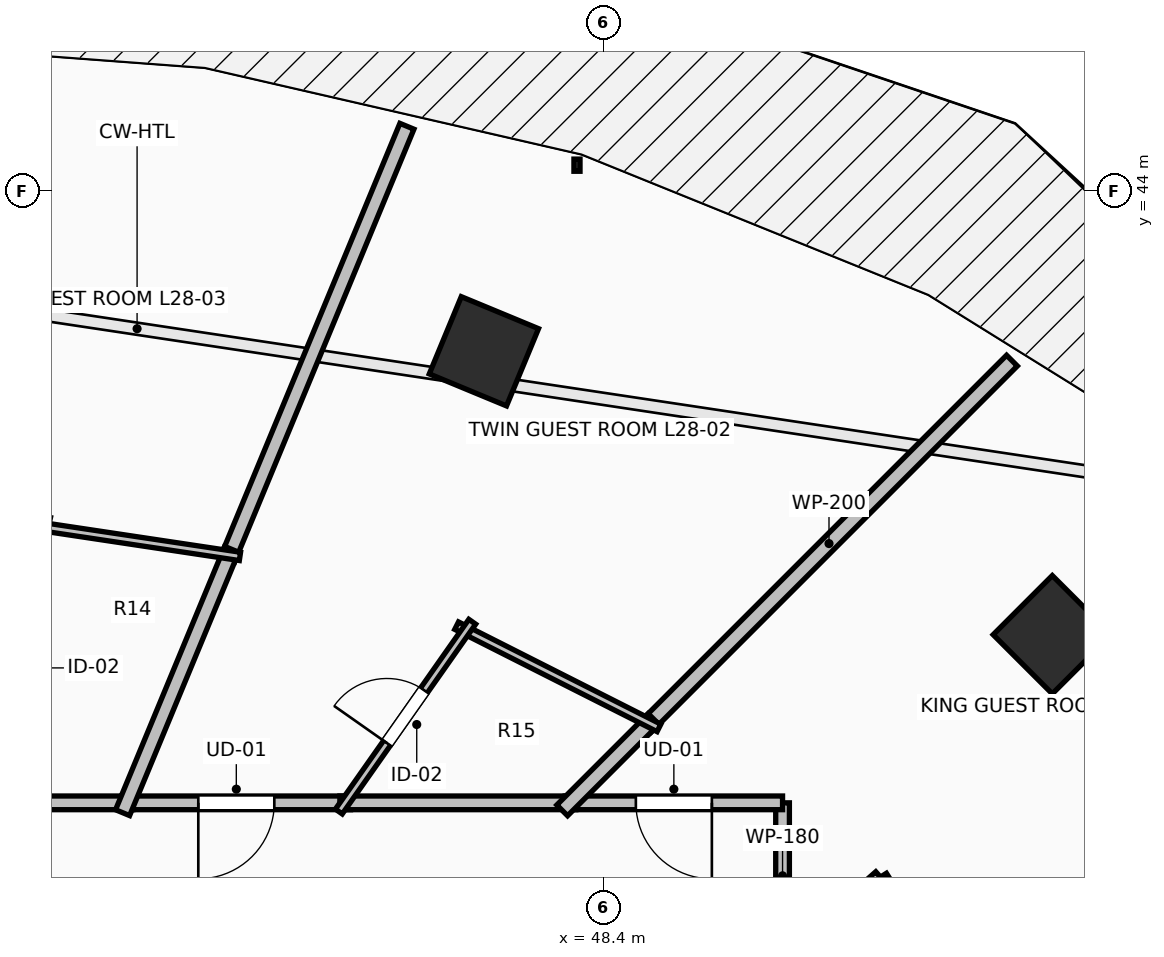
"""IFC4 building model, lengths in metres.
Left out: names, types, materials, properties, quantities, classifications, styles, units other than length and angle.
Written with IfcOpenShell. Run it as: python <this file> out.ifc"""

import sys

from ifc_helpers import new_model, si_unit, direction, frame, frame_2d, origin, origin_2d, place, context, subcontext, project, spatial, rectangle, extrude, element, fill, save


model = new_model("IFC4")
c1 = context("Model", 3, precision=1e-05, world=origin(), true_north=direction((0.0, 1.0)))
c2 = subcontext(c1, "Body", "Model", "MODEL_VIEW")
j1 = project(units=[si_unit("LENGTHUNIT", "METRE"), si_unit("PLANEANGLEUNIT", "RADIAN")], contexts=[c1])
p1 = place(None, origin())
s1 = spatial("IfcSite", under=j1, at=p1, CompositionType="ELEMENT")
p2 = place(p1, origin())
s2 = spatial("IfcBuilding", under=s1, at=p2, CompositionType="ELEMENT")
p3 = place(p2, frame((0.0, 0.0, 106.8)))
s3 = spatial("IfcBuildingStorey", under=s2, at=p3, CompositionType="ELEMENT", Elevation=106.8)
for number, where, z_axis, x_axis in (
    (1, (54.299, 38.162, 0.0), (0.0, 0.0, 1.0), (0.707, 0.707, 0.0)),
    (2, (46.821, 41.891, 0.0), (0.0, 0.0, 1.0), (0.383, 0.924, 0.0)),
):
    element("IfcColumn", number, at=place(p3, frame(where, z_axis=z_axis, x_axis=x_axis)), inside=s3, PredefinedType="COLUMN", context=c2, shape_type="SweptSolid", body=[
        extrude(rectangle(XDim=1.1, YDim=1.1, at=origin_2d()), origin(), (0.0, 0.0, 1.0), 3.5),
    ])
p4 = place(p3, frame((50.75, 34.031, 0.0), z_axis=(0.0, 0.0, 1.0), x_axis=(0.0, 1.0, 0.0)))
e3 = element("IfcWall", 3, at=p4, inside=s3, PredefinedType="PARTITIONING", context=c2, shape_type="SweptSolid", body=[
    extrude(rectangle(XDim=1.919, YDim=0.18, at=frame_2d((0.959, 0.0))), origin(), (0.0, 0.0, 1.0), 2.432),
])
p5 = place(p3, frame((50.75, 35.95, 0.0), z_axis=(0.0, 0.0, 1.0), x_axis=(-1.0, 0.0, 0.0)))
e4 = element("IfcWall", 4, at=p5, inside=s3, PredefinedType="PARTITIONING", context=c2, shape_type="SweptSolid", body=[
    extrude(rectangle(XDim=2.86, YDim=0.18, at=frame_2d((1.43, 0.0))), origin(), (0.0, 0.0, 1.0), 2.432),
])
p6 = place(p5, frame((0.93, 0.0, 0.0)))
e5 = element("IfcOpeningElement", 5, at=p6, cuts=e4, PredefinedType="OPENING", context=c2, shape_type="SweptSolid", body=[
    extrude(rectangle(XDim=1.0, YDim=2.15, at=frame_2d((0.5, 1.075))), frame((0.0, 0.105, 0.0), z_axis=(0.0, -1.0, 0.0), x_axis=(1.0, 0.0, 0.0)), (0.0, 0.0, 1.0), 0.21),
])
p7 = place(p3, frame((45.066, 35.95, 0.0), z_axis=(0.0, 0.0, 1.0), x_axis=(-1.0, 0.0, 0.0)))
e6 = element("IfcWall", 6, at=p7, inside=s3, PredefinedType="PARTITIONING", context=c2, shape_type="SweptSolid", body=[
    extrude(rectangle(XDim=3.005, YDim=0.18, at=frame_2d((1.502, 0.0))), origin(), (0.0, 0.0, 1.0), 3.24),
])
p8 = place(p7, frame((1.002, 0.0, 0.0)))
e7 = element("IfcOpeningElement", 7, at=p8, cuts=e6, PredefinedType="OPENING", context=c2, shape_type="SweptSolid", body=[
    extrude(rectangle(XDim=1.0, YDim=2.15, at=frame_2d((0.5, 1.075))), frame((0.0, 0.105, 0.0), z_axis=(0.0, -1.0, 0.0), x_axis=(1.0, 0.0, 0.0)), (0.0, 0.0, 1.0), 0.21),
])
p9 = place(p3, frame((48.03, 35.95, 0.0), z_axis=(0.0, 0.0, 1.0), x_axis=(-1.0, 0.0, 0.0)))
e8 = element("IfcWall", 8, at=p9, inside=s3, PredefinedType="PARTITIONING", context=c2, shape_type="SweptSolid", body=[
    extrude(rectangle(XDim=3.104, YDim=0.18, at=frame_2d((1.552, 0.0))), origin(), (0.0, 0.0, 1.0), 2.432),
])
p10 = place(p3, frame((42.201, 35.95, 0.0), z_axis=(0.0, 0.0, 1.0), x_axis=(-1.0, 0.0, 0.0)))
e9 = element("IfcWall", 9, at=p10, inside=s3, PredefinedType="PARTITIONING", context=c2, shape_type="SweptSolid", body=[
    extrude(rectangle(XDim=2.056, YDim=0.18, at=frame_2d((1.028, 0.0))), origin(), (0.0, 0.0, 1.0), 3.24),
])
p11 = place(p3, frame((51.935, 35.007, 0.0), z_axis=(0.0, 0.0, 1.0), x_axis=(0.662059609276, -0.749451181709, 0.0)))
e10 = element("IfcWall", 10, at=p11, inside=s3, PredefinedType="PARTITIONING", context=c2, shape_type="SweptSolid", body=[
    extrude(rectangle(XDim=3.299, YDim=0.11, at=frame_2d((1.65, 0.0))), origin(), (0.0, 0.0, 1.0), 2.432),
])
p12 = place(p11, frame((1.225, 0.0, 0.0)))
e11 = element("IfcOpeningElement", 11, at=p12, cuts=e10, PredefinedType="OPENING", context=c2, shape_type="SweptSolid", body=[
    extrude(rectangle(XDim=0.85, YDim=2.1, at=frame_2d((0.425, 1.05))), frame((0.0, 0.07, 0.0), z_axis=(0.0, -1.0, 0.0), x_axis=(1.0, 0.0, 0.0)), (0.0, 0.0, 1.0), 0.14),
])
p13 = place(p3, frame((50.632, 34.016, 0.0), z_axis=(0.0, 0.0, 1.0), x_axis=(0.844361394482, 0.535774052665, 0.0)))
e12 = element("IfcWall", 12, at=p13, inside=s3, PredefinedType="PARTITIONING", context=c2, shape_type="SweptSolid", body=[
    extrude(rectangle(XDim=1.793, YDim=0.11, at=frame_2d((0.897, 0.0))), origin(), (0.0, 0.0, 1.0), 2.886),
])
p14 = place(p3, frame((53.768, 41.768, 0.0), z_axis=(0.0, 0.0, 1.0), x_axis=(-0.707106781187, -0.707106781187, 0.0)))
e13 = element("IfcWall", 13, at=p14, inside=s3, PredefinedType="PARTITIONING", context=c2, shape_type="SweptSolid", body=[
    extrude(rectangle(XDim=6.808, YDim=0.2, at=frame_2d((3.404, 0.0))), origin(), (0.0, 0.0, 1.0), 2.677),
])
p15 = place(p3, frame((49.053, 37.053, 0.0), z_axis=(0.0, 0.0, 1.0), x_axis=(-0.707106781187, -0.707106781187, 0.0)))
e14 = element("IfcWall", 14, at=p15, inside=s3, PredefinedType="PARTITIONING", context=c2, shape_type="SweptSolid", body=[
    extrude(rectangle(XDim=1.7, YDim=0.2, at=frame_2d((0.85, 0.0))), origin(), (0.0, 0.0, 1.0), 2.432),
])
p16 = place(p3, frame((54.156, 32.692, 0.0), z_axis=(0.0, 0.0, 1.0), x_axis=(0.923875192571, 0.38269390974, 0.0)))
e15 = element("IfcWall", 15, at=p16, inside=s3, PredefinedType="PARTITIONING", context=c2, shape_type="SweptSolid", body=[
    extrude(rectangle(XDim=7.311, YDim=0.2, at=frame_2d((3.656, 0.0))), origin(), (0.0, 0.0, 1.0), 2.432),
])
p17 = place(p3, frame((46.462, 38.281, 0.0), z_axis=(0.0, 0.0, 1.0), x_axis=(0.892486842203, -0.451073426944, 0.0)))
e16 = element("IfcWall", 16, at=p17, inside=s3, PredefinedType="PARTITIONING", context=c2, shape_type="SweptSolid", body=[
    extrude(rectangle(XDim=2.982, YDim=0.11, at=frame_2d((1.491, 0.0))), origin(), (0.0, 0.0, 1.0), 2.432),
])
p18 = place(p3, frame((44.913, 35.835, 0.0), z_axis=(0.0, 0.0, 1.0), x_axis=(0.574986040322, 0.818163219312, 0.0)))
e17 = element("IfcWall", 17, at=p18, inside=s3, PredefinedType="PARTITIONING", context=c2, shape_type="SweptSolid", body=[
    extrude(rectangle(XDim=3.052, YDim=0.11, at=frame_2d((1.526, 0.0))), origin(), (0.0, 0.0, 1.0), 2.886),
])
p19 = place(p18, frame((1.101, 0.0, 0.0)))
e18 = element("IfcOpeningElement", 18, at=p19, cuts=e17, PredefinedType="OPENING", context=c2, shape_type="SweptSolid", body=[
    extrude(rectangle(XDim=0.85, YDim=2.1, at=frame_2d((0.425, 1.05))), frame((0.0, 0.07, 0.0), z_axis=(0.0, -1.0, 0.0), x_axis=(1.0, 0.0, 0.0)), (0.0, 0.0, 1.0), 0.14),
])
p20 = place(p3, frame((45.808, 44.851, 0.0), z_axis=(0.0, 0.0, 1.0), x_axis=(-0.382705075352, -0.923870567395, 0.0)))
e19 = element("IfcWall", 19, at=p20, inside=s3, PredefinedType="PARTITIONING", context=c2, shape_type="SweptSolid", body=[
    extrude(rectangle(XDim=6.164, YDim=0.2, at=frame_2d((3.082, 0.0))), origin(), (0.0, 0.0, 1.0), 2.677),
])
p21 = place(p3, frame((43.503, 39.285, 0.0), z_axis=(0.0, 0.0, 1.0), x_axis=(-0.382733183699, -0.923858923265, 0.0)))
e20 = element("IfcWall", 20, at=p21, inside=s3, PredefinedType="PARTITIONING", context=c2, shape_type="SweptSolid", body=[
    extrude(rectangle(XDim=3.75, YDim=0.2, at=frame_2d((1.875, 0.0))), origin(), (0.0, 0.0, 1.0), 2.886),
])
p22 = place(p3, frame((40.896, 39.6, 0.0), z_axis=(0.0, 0.0, 1.0), x_axis=(0.98891024541, -0.148514398367, 0.0)))
e21 = element("IfcWall", 21, at=p22, inside=s3, PredefinedType="PARTITIONING", context=c2, shape_type="SweptSolid", body=[
    extrude(rectangle(XDim=2.745, YDim=0.11, at=frame_2d((1.373, 0.0))), origin(), (0.0, 0.0, 1.0), 2.972),
])
p23 = place(p6, origin())
e22 = element("IfcDoor", 22, at=p23, inside=s3, OperationType="SINGLE_SWING_LEFT", PredefinedType="DOOR", context=c2, shape_type="SweptSolid", body=[
    extrude(rectangle(XDim=1.0, YDim=2.15, at=frame_2d((0.5, 1.075))), frame((0.0, 0.025, 0.0), z_axis=(0.0, -1.0, 0.0), x_axis=(1.0, 0.0, 0.0)), (0.0, 0.0, 1.0), 0.05),
])
fill(e5, e22)
p24 = place(p8, origin())
e23 = element("IfcDoor", 23, at=p24, inside=s3, OperationType="SINGLE_SWING_RIGHT", PredefinedType="DOOR", context=c2, shape_type="SweptSolid", body=[
    extrude(rectangle(XDim=1.0, YDim=2.15, at=frame_2d((0.5, 1.075))), frame((0.0, 0.025, 0.0), z_axis=(0.0, -1.0, 0.0), x_axis=(1.0, 0.0, 0.0)), (0.0, 0.0, 1.0), 0.05),
])
fill(e7, e23)
p25 = place(p19, origin())
e24 = element("IfcDoor", 24, at=p25, inside=s3, OperationType="SINGLE_SWING_LEFT", PredefinedType="DOOR", context=c2, shape_type="SweptSolid", body=[
    extrude(rectangle(XDim=0.85, YDim=2.1, at=frame_2d((0.425, 1.05))), frame((0.0, 0.025, 0.0), z_axis=(0.0, -1.0, 0.0), x_axis=(1.0, 0.0, 0.0)), (0.0, 0.0, 1.0), 0.05),
])
fill(e18, e24)
save(model, sys.argv[1])
